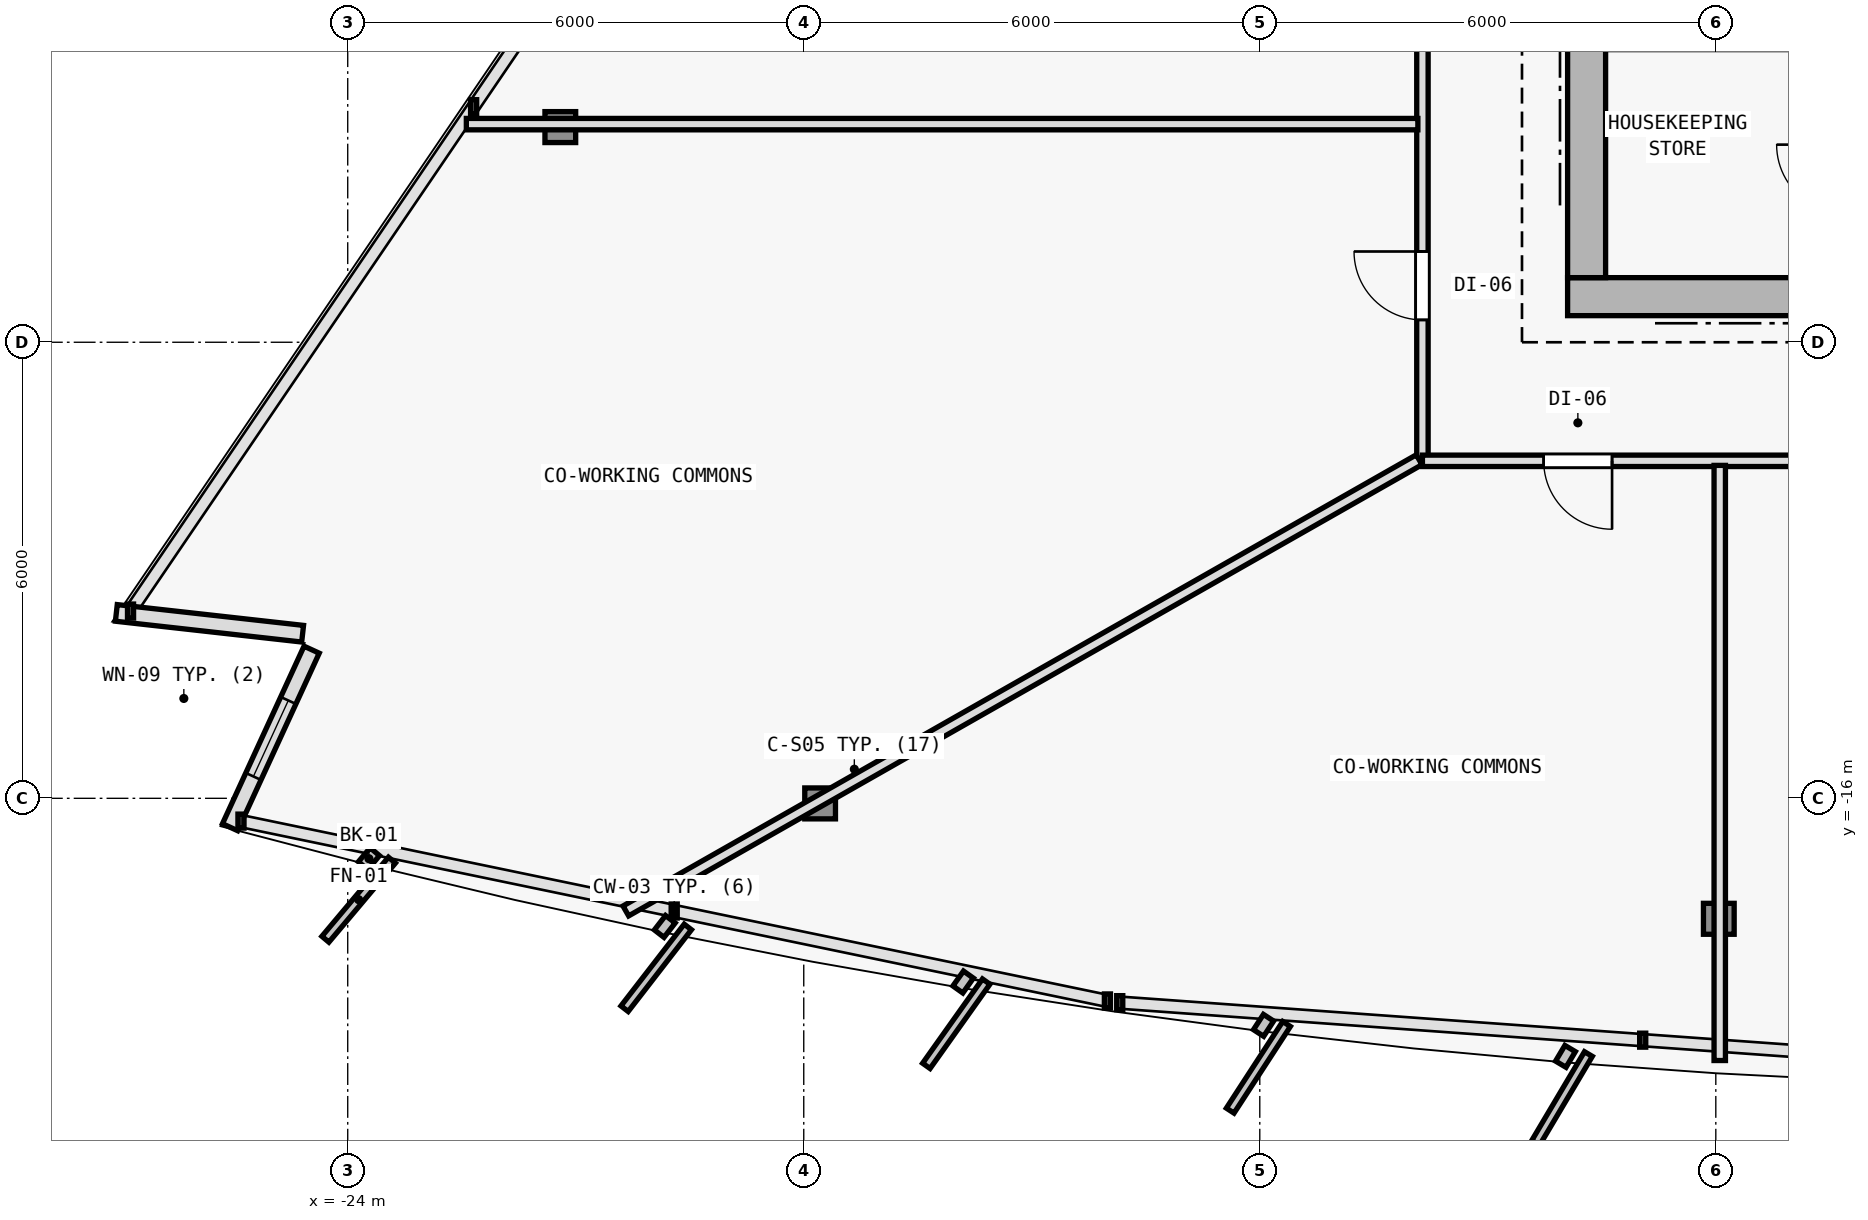
"""IFC4 building model, lengths in metres.
Left out: names, types, materials, properties, quantities, classifications, styles, units other than length and angle.
Written with IfcOpenShell. Run it as: python <this file> out.ifc"""

import sys

from ifc_helpers import new_model, si_unit, direction, frame, frame_2d, origin, origin_2d, place, context, subcontext, project, spatial, rectangle, i_section, extrude, element, fill, save


model = new_model("IFC4")
c1 = context("Model", 3, precision=1e-05, world=origin(), true_north=direction((0.0, 1.0)))
c2 = subcontext(c1, "Body", "Model", "MODEL_VIEW")
j1 = project(units=[si_unit("LENGTHUNIT", "METRE"), si_unit("PLANEANGLEUNIT", "RADIAN")], contexts=[c1])
p1 = place(None, origin())
s1 = spatial("IfcSite", under=j1, at=p1, CompositionType="ELEMENT")
p2 = place(p1, origin())
s2 = spatial("IfcBuilding", under=s1, at=p2, CompositionType="ELEMENT")
p3 = place(p2, frame((0.0, 0.0, 156.6)))
s3 = spatial("IfcBuildingStorey", under=s2, at=p3, CompositionType="ELEMENT", Elevation=156.6)
p4 = place(p3, frame((-7.7, -9.4, 0.0), z_axis=(0.0, 0.0, 1.0), x_axis=(1.0, 0.0, 0.0)))
e1 = element("IfcColumn", 1, at=p4, inside=s3, PredefinedType="COLUMN", context=c2, shape_type="SweptSolid", body=[
    extrude(i_section(OverallWidth=0.404, OverallDepth=0.407, WebThickness=0.017, FlangeThickness=0.028, FilletRadius=0.015, at=origin_2d()), origin(), (0.0, 0.0, 1.0), 3.6),
])
p5 = place(p3, frame((-17.785, -16.067, 0.005), z_axis=(0.020594940847, 0.033441290088, 0.999228466633), x_axis=(-0.851480003019, 0.52438707503, 0.0)))
e2 = element("IfcColumn", 2, at=p5, inside=s3, PredefinedType="COLUMN", context=c2, shape_type="SweptSolid", body=[
    extrude(i_section(OverallWidth=0.404, OverallDepth=0.407, WebThickness=0.017, FlangeThickness=0.028, FilletRadius=0.015, at=origin_2d()), origin(), (0.0, 0.0, 1.0), 3.592),
])
p6 = place(p3, frame((-5.961, -17.585, 0.005), z_axis=(0.00693381708, 0.03528089279, 0.999353381334), x_axis=(-0.981229659911, 0.192842823335, 0.0)))
e3 = element("IfcColumn", 3, at=p6, inside=s3, PredefinedType="COLUMN", context=c2, shape_type="SweptSolid", body=[
    extrude(i_section(OverallWidth=0.404, OverallDepth=0.407, WebThickness=0.017, FlangeThickness=0.028, FilletRadius=0.015, at=origin_2d()), origin(), (0.0, 0.0, 1.0), 3.592),
])
p7 = place(p3, frame((-21.203, -7.169, 0.005), z_axis=(0.025222449659, 0.021619242565, 0.999448065876), x_axis=(-0.650791373456, 0.759256602365, 0.0)))
e4 = element("IfcColumn", 4, at=p7, inside=s3, PredefinedType="COLUMN", context=c2, shape_type="SweptSolid", body=[
    extrude(i_section(OverallWidth=0.404, OverallDepth=0.407, WebThickness=0.017, FlangeThickness=0.028, FilletRadius=0.015, at=origin_2d()), origin(), (0.0, 0.0, 1.0), 3.591),
])
p8 = place(p3, frame((-24.594, -13.834, 0.0), z_axis=(0.0, 0.0, 1.0), x_axis=(-0.993823222634, 0.110974781609, 0.0)))
e5 = element("IfcWall", 5, at=p8, inside=s3, PredefinedType="SOLIDWALL", context=c2, shape_type="SweptSolid", body=[
    extrude(rectangle(XDim=2.466, YDim=0.22, at=frame_2d((1.233, 0.0))), origin(), (0.0, 0.0, 1.0), 3.35),
])
p9 = place(p3, frame((-25.548, -16.38, 0.0), z_axis=(0.0, 0.0, 1.0), x_axis=(0.417449299542, 0.908700215864, 0.0)))
e6 = element("IfcWall", 6, at=p9, inside=s3, PredefinedType="SOLIDWALL", context=c2, shape_type="SweptSolid", body=[
    extrude(rectangle(XDim=2.57, YDim=0.22, at=frame_2d((1.285, 0.0))), origin(), (0.0, 0.0, 1.0), 3.35),
])
p10 = place(p9, frame((0.735, 0.0, 0.62)))
e7 = element("IfcOpeningElement", 7, at=p10, cuts=e6, PredefinedType="OPENING", context=c2, shape_type="SweptSolid", body=[
    extrude(rectangle(XDim=1.1, YDim=1.8, at=frame_2d((0.55, 0.9))), frame((0.0, 0.12, 0.0), z_axis=(0.0, -1.0, 0.0), x_axis=(1.0, 0.0, 0.0)), (0.0, 0.0, 1.0), 0.24),
])
p11 = place(p3, frame((-7.95, -9.4, 0.0), z_axis=(0.0, 0.0, 1.0), x_axis=(1.0, 0.0, 0.0)))
e8 = element("IfcWall", 8, at=p11, inside=s3, PredefinedType="SHEAR", context=c2, shape_type="SweptSolid", body=[
    extrude(rectangle(XDim=15.9, YDim=0.5, at=frame_2d((7.95, 0.0))), origin(), (0.0, 0.0, 1.0), 3.35),
])
p12 = place(p11, frame((9.6, 0.0, 0.0)))
e9 = element("IfcOpeningElement", 9, at=p12, cuts=e8, PredefinedType="OPENING", context=c2, shape_type="SweptSolid", body=[
    extrude(rectangle(XDim=1.5, YDim=2.2, at=frame_2d((0.75, 1.1))), frame((0.0, 0.26, 0.0), z_axis=(0.0, -1.0, 0.0), x_axis=(1.0, 0.0, 0.0)), (0.0, 0.0, 1.0), 0.52),
])
p13 = place(p3, frame((-7.7, -9.15, 0.0), z_axis=(0.0, 0.0, 1.0), x_axis=(0.0, 1.0, 0.0)))
e10 = element("IfcWall", 10, at=p13, inside=s3, PredefinedType="SHEAR", context=c2, shape_type="SweptSolid", body=[
    extrude(rectangle(XDim=19.1, YDim=0.5, at=frame_2d((9.55, 0.0))), origin(), (0.0, 0.0, 1.0), 3.35),
])
p14 = place(p13, frame((12.7, 0.0, 0.0)))
e11 = element("IfcOpeningElement", 11, at=p14, cuts=e10, PredefinedType="OPENING", context=c2, shape_type="SweptSolid", body=[
    extrude(rectangle(XDim=1.1, YDim=2.15, at=frame_2d((0.55, 1.075))), frame((0.0, 0.26, 0.0), z_axis=(0.0, -1.0, 0.0), x_axis=(1.0, 0.0, 0.0)), (0.0, 0.0, 1.0), 0.52),
])
p15 = place(p3, frame((-9.86, -11.56, 0.0), z_axis=(0.0, 0.0, 1.0), x_axis=(0.0, 1.0, 0.0)))
e12 = element("IfcWall", 12, at=p15, inside=s3, PredefinedType="PARTITIONING", context=c2, shape_type="SweptSolid", body=[
    extrude(rectangle(XDim=19.986, YDim=0.15, at=frame_2d((9.993, 0.0))), origin(), (0.0, 0.0, 1.0), 2.775),
])
p16 = place(p15, frame((11.493, 0.0, 0.0)))
e13 = element("IfcOpeningElement", 13, at=p16, cuts=e12, PredefinedType="OPENING", context=c2, shape_type="SweptSolid", body=[
    extrude(rectangle(XDim=0.85, YDim=2.1, at=frame_2d((0.425, 1.05))), frame((0.0, 0.085, 0.0), z_axis=(0.0, -1.0, 0.0), x_axis=(1.0, 0.0, 0.0)), (0.0, 0.0, 1.0), 0.17),
])
p17 = place(p15, frame((10.122, 0.0, 0.0)))
e14 = element("IfcOpeningElement", 14, at=p17, cuts=e12, PredefinedType="OPENING", context=c2, shape_type="SweptSolid", body=[
    extrude(rectangle(XDim=0.85, YDim=2.1, at=frame_2d((0.425, 1.05))), frame((0.0, 0.085, 0.0), z_axis=(0.0, -1.0, 0.0), x_axis=(1.0, 0.0, 0.0)), (0.0, 0.0, 1.0), 0.17),
])
p18 = place(p15, frame((8.211, 0.0, 0.0)))
e15 = element("IfcOpeningElement", 15, at=p18, cuts=e12, PredefinedType="OPENING", context=c2, shape_type="SweptSolid", body=[
    extrude(rectangle(XDim=0.9, YDim=2.1, at=frame_2d((0.45, 1.05))), frame((0.0, 0.085, 0.0), z_axis=(0.0, -1.0, 0.0), x_axis=(1.0, 0.0, 0.0)), (0.0, 0.0, 1.0), 0.17),
])
p19 = place(p15, frame((5.468, 0.0, 0.0)))
e16 = element("IfcOpeningElement", 16, at=p19, cuts=e12, PredefinedType="OPENING", context=c2, shape_type="SweptSolid", body=[
    extrude(rectangle(XDim=0.9, YDim=2.1, at=frame_2d((0.45, 1.05))), frame((0.0, 0.085, 0.0), z_axis=(0.0, -1.0, 0.0), x_axis=(1.0, 0.0, 0.0)), (0.0, 0.0, 1.0), 0.17),
])
p20 = place(p15, frame((1.854, 0.0, 0.0)))
e17 = element("IfcOpeningElement", 17, at=p20, cuts=e12, PredefinedType="OPENING", context=c2, shape_type="SweptSolid", body=[
    extrude(rectangle(XDim=0.9, YDim=2.1, at=frame_2d((0.45, 1.05))), frame((0.0, 0.085, 0.0), z_axis=(0.0, -1.0, 0.0), x_axis=(1.0, 0.0, 0.0)), (0.0, 0.0, 1.0), 0.17),
])
p21 = place(p15, frame((13.346, 0.0, 0.0)))
e18 = element("IfcOpeningElement", 18, at=p21, cuts=e12, PredefinedType="OPENING", context=c2, shape_type="SweptSolid", body=[
    extrude(rectangle(XDim=0.9, YDim=2.1, at=frame_2d((0.45, 1.05))), frame((0.0, 0.085, 0.0), z_axis=(0.0, -1.0, 0.0), x_axis=(1.0, 0.0, 0.0)), (0.0, 0.0, 1.0), 0.17),
])
p22 = place(p3, frame((13.18, -11.56, 0.0), z_axis=(0.0, 0.0, 1.0), x_axis=(-1.0, 0.0, 0.0)))
e19 = element("IfcWall", 19, at=p22, inside=s3, PredefinedType="PARTITIONING", context=c2, shape_type="SweptSolid", body=[
    extrude(rectangle(XDim=23.04, YDim=0.15, at=frame_2d((11.52, 0.0))), origin(), (0.0, 0.0, 1.0), 2.775),
])
p23 = place(p22, frame((20.545, 0.0, 0.0)))
e20 = element("IfcOpeningElement", 20, at=p23, cuts=e19, PredefinedType="OPENING", context=c2, shape_type="SweptSolid", body=[
    extrude(rectangle(XDim=0.9, YDim=2.1, at=frame_2d((0.45, 1.05))), frame((0.0, 0.085, 0.0), z_axis=(0.0, -1.0, 0.0), x_axis=(1.0, 0.0, 0.0)), (0.0, 0.0, 1.0), 0.17),
])
p24 = place(p22, frame((10.309, 0.0, 0.0)))
e21 = element("IfcOpeningElement", 21, at=p24, cuts=e19, PredefinedType="OPENING", context=c2, shape_type="SweptSolid", body=[
    extrude(rectangle(XDim=0.9, YDim=2.1, at=frame_2d((0.45, 1.05))), frame((0.0, 0.085, 0.0), z_axis=(0.0, -1.0, 0.0), x_axis=(1.0, 0.0, 0.0)), (0.0, 0.0, 1.0), 0.17),
])
p25 = place(p3, frame((-9.903, -11.546, 0.0), z_axis=(0.0, 0.0, 1.0), x_axis=(-0.869263564657, -0.49434892046, 0.0)))
e22 = element("IfcWall", 22, at=p25, inside=s3, PredefinedType="PARTITIONING", context=c2, shape_type="SweptSolid", body=[
    extrude(rectangle(XDim=12.007, YDim=0.15, at=frame_2d((6.004, 0.0))), origin(), (0.0, 0.0, 1.0), 2.775),
])
p26 = place(p3, frame((-5.948, -11.62, 0.0), z_axis=(0.0, 0.0, 1.0), x_axis=(0.0, -1.0, 0.0)))
e23 = element("IfcWall", 23, at=p26, inside=s3, PredefinedType="PARTITIONING", context=c2, shape_type="SweptSolid", body=[
    extrude(rectangle(XDim=7.83, YDim=0.15, at=frame_2d((3.915, 0.0))), origin(), (0.0, 0.0, 1.0), 2.775),
])
p27 = place(p3, frame((-9.92, -7.13, 0.0), z_axis=(0.0, 0.0, 1.0), x_axis=(-1.0, 0.0, 0.0)))
e24 = element("IfcWall", 24, at=p27, inside=s3, PredefinedType="PARTITIONING", context=c2, shape_type="SweptSolid", body=[
    extrude(rectangle(XDim=12.519, YDim=0.15, at=frame_2d((6.26, 0.0))), origin(), (0.0, 0.0, 1.0), 2.775),
])
p28 = place(p10, origin())
e25 = element("IfcWindow", 25, at=p28, inside=s3, PartitioningType="SINGLE_PANEL", PredefinedType="WINDOW", context=c2, shape_type="SweptSolid", body=[
    extrude(rectangle(XDim=1.1, YDim=1.8, at=frame_2d((0.55, 0.9))), frame((0.0, 0.03, 0.0), z_axis=(0.0, -1.0, 0.0), x_axis=(1.0, 0.0, 0.0)), (0.0, 0.0, 1.0), 0.06),
])
fill(e7, e25)
p29 = place(p20, origin())
e26 = element("IfcDoor", 26, at=p29, inside=s3, OperationType="SINGLE_SWING_RIGHT", PredefinedType="DOOR", context=c2, shape_type="SweptSolid", body=[
    extrude(rectangle(XDim=0.9, YDim=2.1, at=frame_2d((0.45, 1.05))), frame((0.0, 0.025, 0.0), z_axis=(0.0, -1.0, 0.0), x_axis=(1.0, 0.0, 0.0)), (0.0, 0.0, 1.0), 0.05),
])
fill(e17, e26)
p30 = place(p23, origin())
e27 = element("IfcDoor", 27, at=p30, inside=s3, OperationType="SINGLE_SWING_LEFT", PredefinedType="DOOR", context=c2, shape_type="SweptSolid", body=[
    extrude(rectangle(XDim=0.9, YDim=2.1, at=frame_2d((0.45, 1.05))), frame((0.0, 0.025, 0.0), z_axis=(0.0, -1.0, 0.0), x_axis=(1.0, 0.0, 0.0)), (0.0, 0.0, 1.0), 0.05),
])
fill(e20, e27)
save(model, sys.argv[1])
